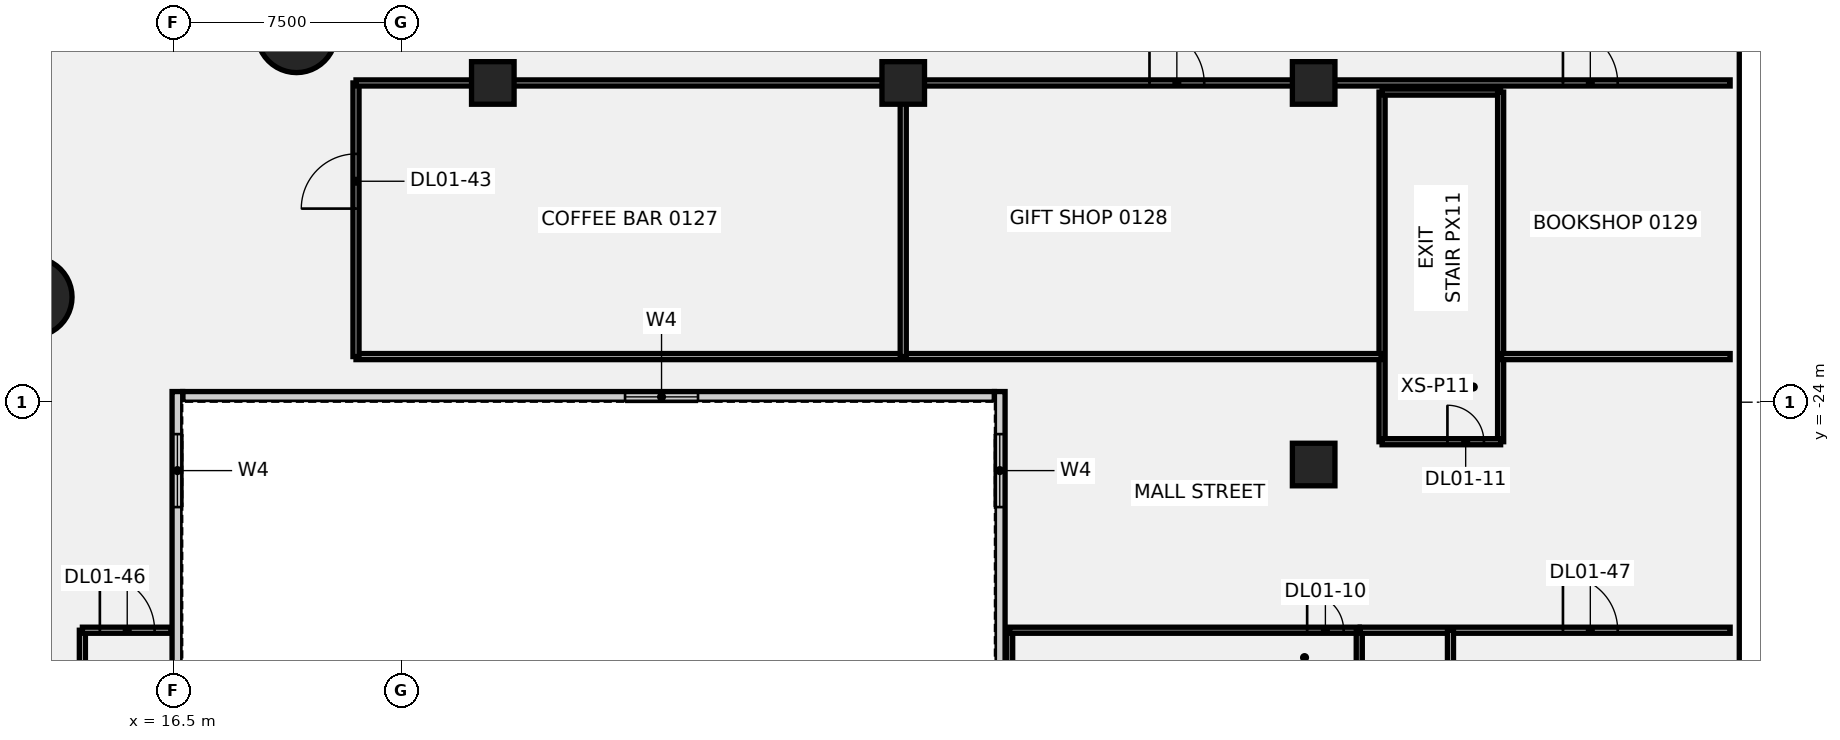
"""IFC4 building model, lengths in metres.
Left out: names, types, materials, properties, quantities, classifications, styles, units other than length and angle.
Written with IfcOpenShell. Run it as: python <this file> out.ifc"""

import sys

from ifc_helpers import new_model, si_unit, direction, frame, frame_2d, origin, origin_2d, place, context, subcontext, project, spatial, rectangle, circle, extrude, element, fill, save


model = new_model("IFC4")
c1 = context("Model", 3, precision=1e-05, world=origin(), true_north=direction((0.0, 1.0)))
c2 = subcontext(c1, "Body", "Model", "MODEL_VIEW")
j1 = project(units=[si_unit("LENGTHUNIT", "METRE"), si_unit("PLANEANGLEUNIT", "RADIAN")], contexts=[c1])
p1 = place(None, origin())
s1 = spatial("IfcSite", under=j1, at=p1, CompositionType="ELEMENT")
p2 = place(p1, origin())
s2 = spatial("IfcBuilding", under=s1, at=p2, CompositionType="ELEMENT")
p3 = place(p2, frame((0.0, 0.0, 9.0)))
s3 = spatial("IfcBuildingStorey", under=s2, at=p3, CompositionType="ELEMENT", Elevation=9.0)
for number, where, z_axis, x_axis in (
    (1, (11.86, -20.543, -0.5), (0.0, 0.0, 1.0), (1.0, 0.0, 0.0)),
    (2, (20.543, -11.86, -0.5), (0.0, 0.0, 1.0), (1.0, 0.0, 0.0)),
):
    element("IfcColumn", number, at=place(p3, frame(where, z_axis=z_axis, x_axis=x_axis)), inside=s3, PredefinedType="COLUMN", context=c2, shape_type="SweptSolid", body=[
        extrude(circle(Radius=1.3, at=origin_2d()), origin(), (0.0, 0.0, 1.0), 6.0),
    ])
for number, where, z_axis, x_axis in (
    (3, (27.0, -13.5, -0.5), (0.0, 0.0, 1.0), (1.0, 0.0, 0.0)),
    (4, (40.5, -13.5, -0.5), (0.0, 0.0, 1.0), (1.0, 0.0, 0.0)),
    (5, (54.0, -26.05, -0.5), (0.0, 0.0, 1.0), (1.0, 0.0, 0.0)),
    (6, (54.0, -13.5, -0.5), (0.0, 0.0, 1.0), (1.0, 0.0, 0.0)),
):
    element("IfcColumn", number, at=place(p3, frame(where, z_axis=z_axis, x_axis=x_axis)), inside=s3, PredefinedType="COLUMN", context=c2, shape_type="SweptSolid", body=[
        extrude(rectangle(XDim=1.4, YDim=1.4, at=origin_2d()), origin(), (0.0, 0.0, 1.0), 6.0),
    ])
p4 = place(p3, frame((44.0, -35.4, 0.0), z_axis=(0.0, 0.0, 1.0), x_axis=(0.0, 1.0, 0.0)))
e7 = element("IfcWall", 7, at=p4, inside=s3, PredefinedType="PARTITIONING", context=c2, shape_type="SweptSolid", body=[
    extrude(rectangle(XDim=3.9, YDim=0.2, at=frame_2d((1.95, 0.0))), origin(), (0.0, 0.0, 1.0), 5.5),
])
p5 = place(p3, frame((44.0, -31.5, 0.0), z_axis=(0.0, 0.0, 1.0), x_axis=(1.0, 0.0, 0.0)))
e8 = element("IfcWall", 8, at=p5, inside=s3, PredefinedType="PARTITIONING", context=c2, shape_type="SweptSolid", body=[
    extrude(rectangle(XDim=11.5, YDim=0.2, at=frame_2d((5.75, 0.0))), origin(), (0.0, 0.0, 1.0), 5.5),
])
p6 = place(p5, frame((9.786, 0.0, 0.0)))
e9 = element("IfcOpeningElement", 9, at=p6, cuts=e8, PredefinedType="OPENING", context=c2, shape_type="SweptSolid", body=[
    extrude(rectangle(XDim=1.2, YDim=2.1, at=frame_2d((0.6, 1.05))), frame((0.0, 0.11, 0.0), z_axis=(0.0, -1.0, 0.0), x_axis=(1.0, 0.0, 0.0)), (0.0, 0.0, 1.0), 0.22),
])
p7 = place(p3, frame((55.5, -35.4, 0.0), z_axis=(0.0, 0.0, 1.0), x_axis=(0.0, 1.0, 0.0)))
e10 = element("IfcWall", 10, at=p7, inside=s3, PredefinedType="PARTITIONING", context=c2, shape_type="SweptSolid", body=[
    extrude(rectangle(XDim=3.9, YDim=0.2, at=frame_2d((1.95, 0.0))), origin(), (0.0, 0.0, 1.0), 5.5),
])
p8 = place(p3, frame((56.25, -25.3, 0.0), z_axis=(0.0, 0.0, 1.0), x_axis=(0.0, 1.0, 0.0)))
e11 = element("IfcWall", 11, at=p8, inside=s3, PredefinedType="PARTITIONING", context=c2, shape_type="SweptSolid", body=[
    extrude(rectangle(XDim=11.5, YDim=0.2, at=frame_2d((5.75, 0.0))), origin(), (0.0, 0.0, 1.0), 5.5),
])
p9 = place(p3, frame((56.25, -13.8, 0.0), z_axis=(0.0, 0.0, 1.0), x_axis=(1.0, 0.0, 0.0)))
e12 = element("IfcWall", 12, at=p9, inside=s3, PredefinedType="PARTITIONING", context=c2, shape_type="SweptSolid", body=[
    extrude(rectangle(XDim=3.9, YDim=0.2, at=frame_2d((1.95, 0.0))), origin(), (0.0, 0.0, 1.0), 5.5),
])
p10 = place(p3, frame((60.15, -25.3, 0.0), z_axis=(0.0, 0.0, 1.0), x_axis=(0.0, 1.0, 0.0)))
e13 = element("IfcWall", 13, at=p10, inside=s3, PredefinedType="PARTITIONING", context=c2, shape_type="SweptSolid", body=[
    extrude(rectangle(XDim=11.5, YDim=0.2, at=frame_2d((5.75, 0.0))), origin(), (0.0, 0.0, 1.0), 5.5),
])
p11 = place(p3, frame((56.25, -25.3, 0.0), z_axis=(0.0, 0.0, 1.0), x_axis=(1.0, 0.0, 0.0)))
e14 = element("IfcWall", 14, at=p11, inside=s3, PredefinedType="PARTITIONING", context=c2, shape_type="SweptSolid", body=[
    extrude(rectangle(XDim=3.9, YDim=0.2, at=frame_2d((1.95, 0.0))), origin(), (0.0, 0.0, 1.0), 5.5),
])
p12 = place(p11, frame((2.15, 0.0, 0.0)))
e15 = element("IfcOpeningElement", 15, at=p12, cuts=e14, PredefinedType="OPENING", context=c2, shape_type="SweptSolid", body=[
    extrude(rectangle(XDim=1.2, YDim=2.1, at=frame_2d((0.6, 1.05))), frame((0.0, 0.11, 0.0), z_axis=(0.0, -1.0, 0.0), x_axis=(1.0, 0.0, 0.0)), (0.0, 0.0, 1.0), 0.22),
])
p13 = place(p3, frame((13.5, -34.22, 0.0), z_axis=(0.0, 0.0, 1.0), x_axis=(0.0, 1.0, 0.0)))
e16 = element("IfcWall", 16, at=p13, inside=s3, PredefinedType="PARTITIONING", context=c2, shape_type="SweptSolid", body=[
    extrude(rectangle(XDim=2.72, YDim=0.2, at=frame_2d((1.36, 0.0))), origin(), (0.0, 0.0, 1.0), 5.5),
])
p14 = place(p3, frame((13.5, -31.5, 0.0), z_axis=(0.0, 0.0, 1.0), x_axis=(1.0, 0.0, 0.0)))
e17 = element("IfcWall", 17, at=p14, inside=s3, PredefinedType="PARTITIONING", context=c2, shape_type="SweptSolid", body=[
    extrude(rectangle(XDim=2.92, YDim=0.2, at=frame_2d((1.46, 0.0))), origin(), (0.0, 0.0, 1.0), 5.5),
])
p15 = place(p14, frame((0.575, 0.0, 0.0)))
e18 = element("IfcOpeningElement", 18, at=p15, cuts=e17, PredefinedType="OPENING", context=c2, shape_type="SweptSolid", body=[
    extrude(rectangle(XDim=1.8, YDim=2.1, at=frame_2d((0.9, 1.05))), frame((0.0, 0.11, 0.0), z_axis=(0.0, -1.0, 0.0), x_axis=(1.0, 0.0, 0.0)), (0.0, 0.0, 1.0), 0.22),
])
p16 = place(p3, frame((22.5, -22.5, 0.0), z_axis=(0.0, 0.0, 1.0), x_axis=(1.0, 0.0, 0.0)))
e19 = element("IfcWall", 19, at=p16, inside=s3, PredefinedType="PARTITIONING", context=c2, shape_type="SweptSolid", body=[
    extrude(rectangle(XDim=33.72, YDim=0.2, at=frame_2d((16.86, 0.0))), origin(), (0.0, 0.0, 1.0), 5.5),
])
p17 = place(p3, frame((40.5, -22.5, 0.0), z_axis=(0.0, 0.0, 1.0), x_axis=(0.0, 1.0, 0.0)))
e20 = element("IfcWall", 20, at=p17, inside=s3, PredefinedType="PARTITIONING", context=c2, shape_type="SweptSolid", body=[
    extrude(rectangle(XDim=9.0, YDim=0.2, at=frame_2d((4.5, 0.0))), origin(), (0.0, 0.0, 1.0), 5.5),
])
p18 = place(p3, frame((22.5, -22.5, 0.0), z_axis=(0.0, 0.0, 1.0), x_axis=(0.0, 1.0, 0.0)))
e21 = element("IfcWall", 21, at=p18, inside=s3, PredefinedType="PARTITIONING", context=c2, shape_type="SweptSolid", body=[
    extrude(rectangle(XDim=9.0, YDim=0.2, at=frame_2d((4.5, 0.0))), origin(), (0.0, 0.0, 1.0), 5.5),
])
p19 = place(p18, frame((4.867, 0.0, 0.0)))
e22 = element("IfcOpeningElement", 22, at=p19, cuts=e21, PredefinedType="OPENING", context=c2, shape_type="SweptSolid", body=[
    extrude(rectangle(XDim=1.8, YDim=2.1, at=frame_2d((0.9, 1.05))), frame((0.0, 0.11, 0.0), z_axis=(0.0, -1.0, 0.0), x_axis=(1.0, 0.0, 0.0)), (0.0, 0.0, 1.0), 0.22),
])
p20 = place(p3, frame((22.5, -13.5, 0.0), z_axis=(0.0, 0.0, 1.0), x_axis=(1.0, 0.0, 0.0)))
e23 = element("IfcWall", 23, at=p20, inside=s3, PredefinedType="PARTITIONING", context=c2, shape_type="SweptSolid", body=[
    extrude(rectangle(XDim=45.199, YDim=0.2, at=frame_2d((22.6, 0.0))), origin(), (0.0, 0.0, 1.0), 5.5),
])
p21 = place(p20, frame((26.1, 0.0, 0.0)))
e24 = element("IfcOpeningElement", 24, at=p21, cuts=e23, PredefinedType="OPENING", context=c2, shape_type="SweptSolid", body=[
    extrude(rectangle(XDim=1.8, YDim=2.1, at=frame_2d((0.9, 1.05))), frame((0.0, 0.11, 0.0), z_axis=(0.0, -1.0, 0.0), x_axis=(1.0, 0.0, 0.0)), (0.0, 0.0, 1.0), 0.22),
])
p22 = place(p20, frame((39.7, 0.0, 0.0)))
e25 = element("IfcOpeningElement", 25, at=p22, cuts=e23, PredefinedType="OPENING", context=c2, shape_type="SweptSolid", body=[
    extrude(rectangle(XDim=1.8, YDim=2.1, at=frame_2d((0.9, 1.05))), frame((0.0, 0.11, 0.0), z_axis=(0.0, -1.0, 0.0), x_axis=(1.0, 0.0, 0.0)), (0.0, 0.0, 1.0), 0.22),
])
p23 = place(p3, frame((55.53, -31.5, 0.0), z_axis=(0.0, 0.0, 1.0), x_axis=(1.0, 0.0, 0.0)))
e26 = element("IfcWall", 26, at=p23, inside=s3, PredefinedType="PARTITIONING", context=c2, shape_type="SweptSolid", body=[
    extrude(rectangle(XDim=12.169, YDim=0.2, at=frame_2d((6.084, 0.0))), origin(), (0.0, 0.0, 1.0), 5.5),
])
p24 = place(p23, frame((6.67, 0.0, 0.0)))
e27 = element("IfcOpeningElement", 27, at=p24, cuts=e26, PredefinedType="OPENING", context=c2, shape_type="SweptSolid", body=[
    extrude(rectangle(XDim=1.8, YDim=2.1, at=frame_2d((0.9, 1.05))), frame((0.0, 0.11, 0.0), z_axis=(0.0, -1.0, 0.0), x_axis=(1.0, 0.0, 0.0)), (0.0, 0.0, 1.0), 0.22),
])
p25 = place(p3, frame((58.5, -40.5, 0.0), z_axis=(0.0, 0.0, 1.0), x_axis=(0.0, 1.0, 0.0)))
e28 = element("IfcWall", 28, at=p25, inside=s3, PredefinedType="PARTITIONING", context=c2, shape_type="SweptSolid", body=[
    extrude(rectangle(XDim=9.0, YDim=0.2, at=frame_2d((4.5, 0.0))), origin(), (0.0, 0.0, 1.0), 5.5),
])
p26 = place(p3, frame((60.18, -22.5, 0.0), z_axis=(0.0, 0.0, 1.0), x_axis=(1.0, 0.0, 0.0)))
e29 = element("IfcWall", 29, at=p26, inside=s3, PredefinedType="PARTITIONING", context=c2, shape_type="SweptSolid", body=[
    extrude(rectangle(XDim=7.519, YDim=0.2, at=frame_2d((3.76, 0.0))), origin(), (0.0, 0.0, 1.0), 5.5),
])
p27 = place(p3, frame((16.8, -23.825, 0.0), z_axis=(0.0, 0.0, 1.0), x_axis=(1.0, 0.0, 0.0)))
e30 = element("IfcWall", 30, at=p27, inside=s3, PredefinedType="SOLIDWALL", context=c2, shape_type="SweptSolid", body=[
    extrude(rectangle(XDim=26.7, YDim=0.35, at=frame_2d((13.35, 0.0))), origin(), (0.0, 0.0, 1.0), 5.5),
])
p28 = place(p27, frame((14.55, 0.0, 1.0)))
e31 = element("IfcOpeningElement", 31, at=p28, cuts=e30, PredefinedType="OPENING", context=c2, shape_type="SweptSolid", body=[
    extrude(rectangle(XDim=2.4, YDim=1.8, at=frame_2d((1.2, 0.9))), frame((0.0, 0.185, 0.0), z_axis=(0.0, -1.0, 0.0), x_axis=(1.0, 0.0, 0.0)), (0.0, 0.0, 1.0), 0.37),
])
p29 = place(p3, frame((16.625, -42.35, 0.0), z_axis=(0.0, 0.0, 1.0), x_axis=(0.0, 1.0, 0.0)))
e32 = element("IfcWall", 32, at=p29, inside=s3, PredefinedType="SOLIDWALL", context=c2, shape_type="SweptSolid", body=[
    extrude(rectangle(XDim=18.7, YDim=0.35, at=frame_2d((9.35, 0.0))), origin(), (0.0, 0.0, 1.0), 5.5),
])
p30 = place(p29, frame((14.9, 0.0, 1.0)))
e33 = element("IfcOpeningElement", 33, at=p30, cuts=e32, PredefinedType="OPENING", context=c2, shape_type="SweptSolid", body=[
    extrude(rectangle(XDim=2.4, YDim=1.8, at=frame_2d((1.2, 0.9))), frame((0.0, 0.185, 0.0), z_axis=(0.0, -1.0, 0.0), x_axis=(1.0, 0.0, 0.0)), (0.0, 0.0, 1.0), 0.37),
])
p31 = place(p3, frame((43.675, -42.35, 0.0), z_axis=(0.0, 0.0, 1.0), x_axis=(0.0, 1.0, 0.0)))
e34 = element("IfcWall", 34, at=p31, inside=s3, PredefinedType="SOLIDWALL", context=c2, shape_type="SweptSolid", body=[
    extrude(rectangle(XDim=18.7, YDim=0.35, at=frame_2d((9.35, 0.0))), origin(), (0.0, 0.0, 1.0), 5.5),
])
p32 = place(p31, frame((14.9, 0.0, 1.0)))
e35 = element("IfcOpeningElement", 35, at=p32, cuts=e34, PredefinedType="OPENING", context=c2, shape_type="SweptSolid", body=[
    extrude(rectangle(XDim=2.4, YDim=1.8, at=frame_2d((1.2, 0.9))), frame((0.0, 0.185, 0.0), z_axis=(0.0, -1.0, 0.0), x_axis=(1.0, 0.0, 0.0)), (0.0, 0.0, 1.0), 0.37),
])
p33 = place(p6, origin())
e36 = element("IfcDoor", 36, at=p33, inside=s3, OperationType="SINGLE_SWING_RIGHT", PredefinedType="DOOR", context=c2, shape_type="SweptSolid", body=[
    extrude(rectangle(XDim=1.2, YDim=2.1, at=frame_2d((0.6, 1.05))), frame((0.0, 0.025, 0.0), z_axis=(0.0, -1.0, 0.0), x_axis=(1.0, 0.0, 0.0)), (0.0, 0.0, 1.0), 0.05),
])
fill(e9, e36)
p34 = place(p12, origin())
e37 = element("IfcDoor", 37, at=p34, inside=s3, OperationType="SINGLE_SWING_LEFT", PredefinedType="DOOR", context=c2, shape_type="SweptSolid", body=[
    extrude(rectangle(XDim=1.2, YDim=2.1, at=frame_2d((0.6, 1.05))), frame((0.0, 0.025, 0.0), z_axis=(0.0, -1.0, 0.0), x_axis=(1.0, 0.0, 0.0)), (0.0, 0.0, 1.0), 0.05),
])
fill(e15, e37)
p35 = place(p19, origin())
e38 = element("IfcDoor", 38, at=p35, inside=s3, OperationType="SINGLE_SWING_LEFT", PredefinedType="DOOR", context=c2, shape_type="SweptSolid", body=[
    extrude(rectangle(XDim=1.8, YDim=2.1, at=frame_2d((0.9, 1.05))), frame((0.0, 0.025, 0.0), z_axis=(0.0, -1.0, 0.0), x_axis=(1.0, 0.0, 0.0)), (0.0, 0.0, 1.0), 0.05),
])
fill(e22, e38)
p36 = place(p21, origin())
e39 = element("IfcDoor", 39, at=p36, inside=s3, OperationType="SINGLE_SWING_RIGHT", PredefinedType="DOOR", context=c2, shape_type="SweptSolid", body=[
    extrude(rectangle(XDim=1.8, YDim=2.1, at=frame_2d((0.9, 1.05))), frame((0.0, 0.025, 0.0), z_axis=(0.0, -1.0, 0.0), x_axis=(1.0, 0.0, 0.0)), (0.0, 0.0, 1.0), 0.05),
])
fill(e24, e39)
p37 = place(p22, origin())
e40 = element("IfcDoor", 40, at=p37, inside=s3, OperationType="SINGLE_SWING_LEFT", PredefinedType="DOOR", context=c2, shape_type="SweptSolid", body=[
    extrude(rectangle(XDim=1.8, YDim=2.1, at=frame_2d((0.9, 1.05))), frame((0.0, 0.025, 0.0), z_axis=(0.0, -1.0, 0.0), x_axis=(1.0, 0.0, 0.0)), (0.0, 0.0, 1.0), 0.05),
])
fill(e25, e40)
p38 = place(p15, origin())
e41 = element("IfcDoor", 41, at=p38, inside=s3, OperationType="SINGLE_SWING_RIGHT", PredefinedType="DOOR", context=c2, shape_type="SweptSolid", body=[
    extrude(rectangle(XDim=1.8, YDim=2.1, at=frame_2d((0.9, 1.05))), frame((0.0, 0.025, 0.0), z_axis=(0.0, -1.0, 0.0), x_axis=(1.0, 0.0, 0.0)), (0.0, 0.0, 1.0), 0.05),
])
fill(e18, e41)
p39 = place(p24, origin())
e42 = element("IfcDoor", 42, at=p39, inside=s3, OperationType="SINGLE_SWING_LEFT", PredefinedType="DOOR", context=c2, shape_type="SweptSolid", body=[
    extrude(rectangle(XDim=1.8, YDim=2.1, at=frame_2d((0.9, 1.05))), frame((0.0, 0.025, 0.0), z_axis=(0.0, -1.0, 0.0), x_axis=(1.0, 0.0, 0.0)), (0.0, 0.0, 1.0), 0.05),
])
fill(e27, e42)
p40 = place(p28, origin())
e43 = element("IfcWindow", 43, at=p40, inside=s3, PartitioningType="SINGLE_PANEL", PredefinedType="WINDOW", context=c2, shape_type="SweptSolid", body=[
    extrude(rectangle(XDim=2.4, YDim=1.8, at=frame_2d((1.2, 0.9))), frame((0.0, 0.03, 0.0), z_axis=(0.0, -1.0, 0.0), x_axis=(1.0, 0.0, 0.0)), (0.0, 0.0, 1.0), 0.06),
])
fill(e31, e43)
p41 = place(p30, origin())
e44 = element("IfcWindow", 44, at=p41, inside=s3, PartitioningType="SINGLE_PANEL", PredefinedType="WINDOW", context=c2, shape_type="SweptSolid", body=[
    extrude(rectangle(XDim=2.4, YDim=1.8, at=frame_2d((1.2, 0.9))), frame((0.0, 0.03, 0.0), z_axis=(0.0, -1.0, 0.0), x_axis=(1.0, 0.0, 0.0)), (0.0, 0.0, 1.0), 0.06),
])
fill(e33, e44)
p42 = place(p32, origin())
e45 = element("IfcWindow", 45, at=p42, inside=s3, PartitioningType="SINGLE_PANEL", PredefinedType="WINDOW", context=c2, shape_type="SweptSolid", body=[
    extrude(rectangle(XDim=2.4, YDim=1.8, at=frame_2d((1.2, 0.9))), frame((0.0, 0.03, 0.0), z_axis=(0.0, -1.0, 0.0), x_axis=(1.0, 0.0, 0.0)), (0.0, 0.0, 1.0), 0.06),
])
fill(e35, e45)
save(model, sys.argv[1])
